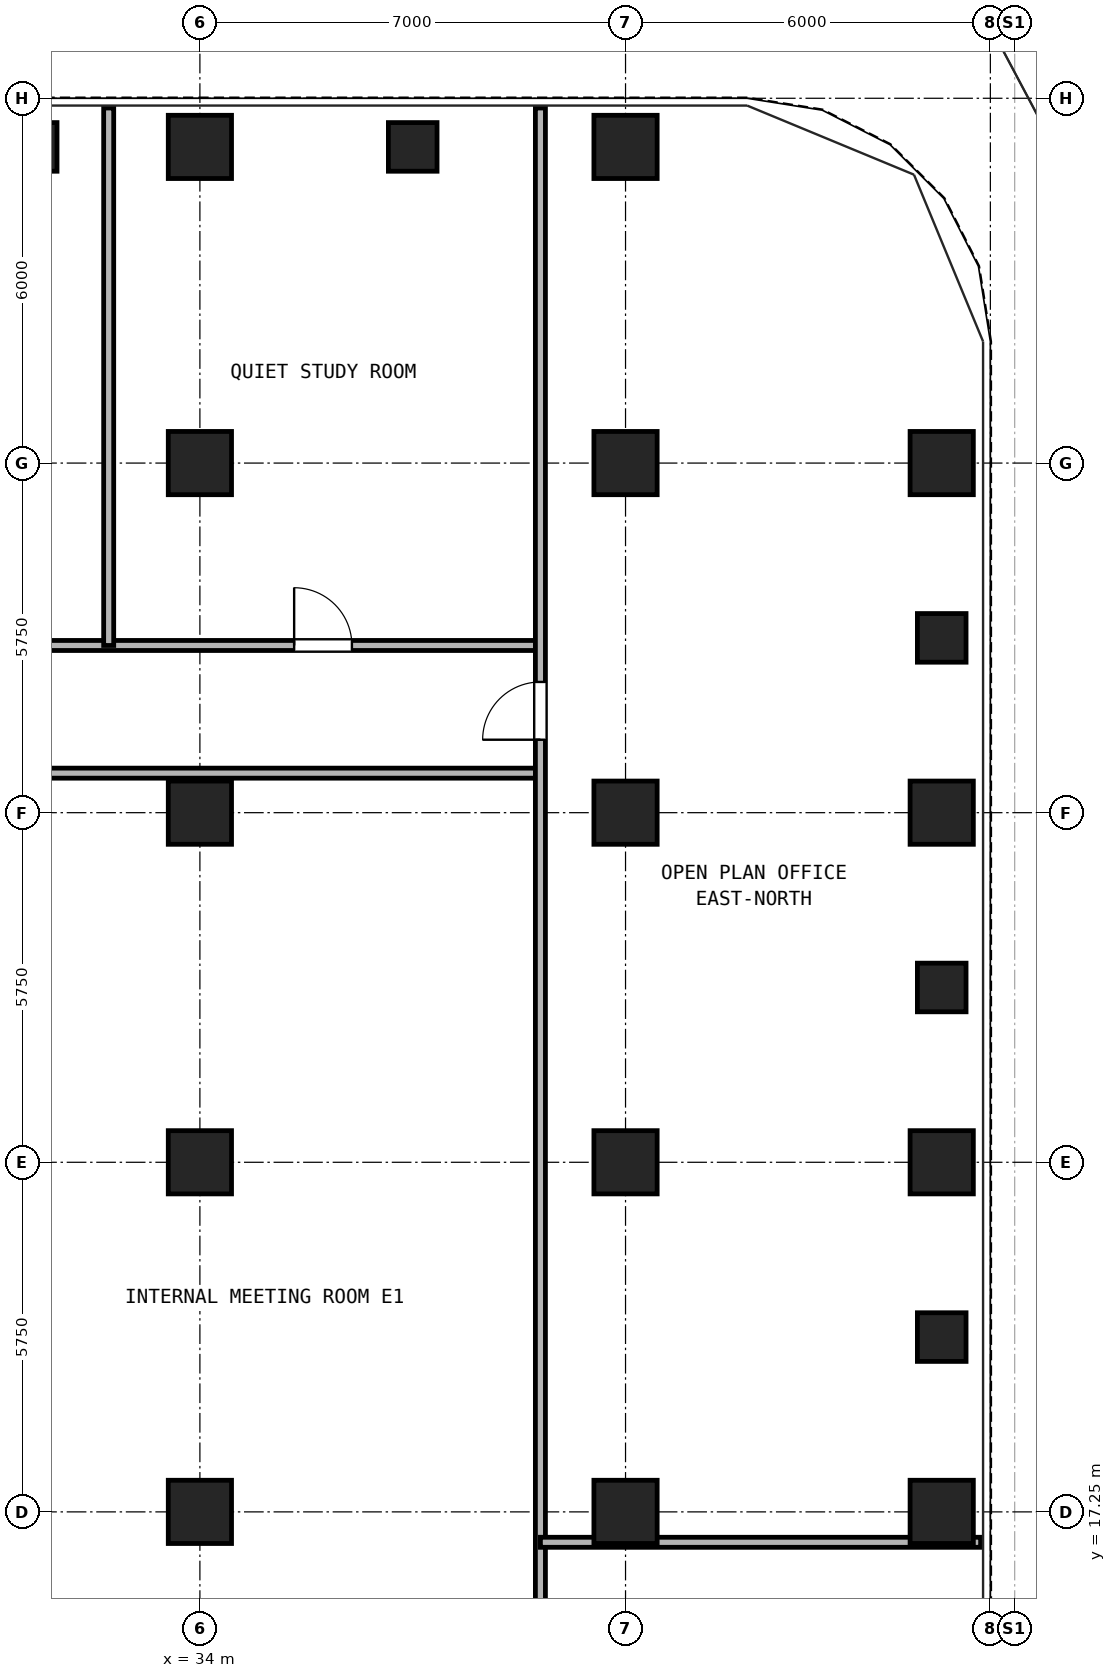
"""IFC4 building model, lengths in metres.
Left out: names, types, materials, properties, quantities, classifications, styles, units other than length and angle.
Written with IfcOpenShell. Run it as: python <this file> out.ifc"""

import sys

from ifc_helpers import new_model, si_unit, direction, frame, frame_2d, origin, origin_2d, place, context, subcontext, project, spatial, rectangle, hollow_rectangle, extrude, source, transform, mapped, element, fill, save


model = new_model("IFC4")
c1 = context("Model", 3, precision=1e-05, world=origin(), true_north=direction((0.0, 1.0)))
c2 = subcontext(c1, "Body", "Model", "MODEL_VIEW")
j1 = project(units=[si_unit("LENGTHUNIT", "METRE"), si_unit("PLANEANGLEUNIT", "RADIAN")], contexts=[c1])
p1 = place(None, origin())
s1 = spatial("IfcSite", under=j1, at=p1, CompositionType="ELEMENT")
p2 = place(p1, origin())
s2 = spatial("IfcBuilding", under=s1, at=p2, CompositionType="ELEMENT")
p3 = place(p2, frame((0.0, 0.0, 40.5)))
s3 = spatial("IfcBuildingStorey", under=s2, at=p3, CompositionType="ELEMENT", Elevation=40.5)
m1 = source(origin(), c2, "Body", "SweptSolid", [
    extrude(hollow_rectangle(XDim=1.04, YDim=1.04, WallThickness=0.065, at=origin_2d()), origin(), (0.0, 0.0, 1.0), 3.32),
])
for number, where, z_axis, x_axis in (
    (1, (34.0, 39.7, 0.0), (0.0, 0.0, 1.0), (1.0, 0.0, 0.0)),
    (2, (41.0, 39.7, 0.0), (0.0, 0.0, 1.0), (1.0, 0.0, 0.0)),
    (3, (46.2, 17.25, 0.0), (0.0, 0.0, 1.0), (1.0, 0.0, 0.0)),
    (4, (46.2, 23.0, 0.0), (0.0, 0.0, 1.0), (1.0, 0.0, 0.0)),
    (5, (46.2, 28.75, 0.0), (0.0, 0.0, 1.0), (1.0, 0.0, 0.0)),
    (6, (46.2, 34.5, 0.0), (0.0, 0.0, 1.0), (1.0, 0.0, 0.0)),
    (7, (34.0, 17.25, 0.0), (0.0, 0.0, 1.0), (1.0, 0.0, 0.0)),
    (8, (34.0, 23.0, 0.0), (0.0, 0.0, 1.0), (1.0, 0.0, 0.0)),
    (9, (34.0, 28.75, 0.0), (0.0, 0.0, 1.0), (1.0, 0.0, 0.0)),
    (10, (34.0, 34.5, 0.0), (0.0, 0.0, 1.0), (1.0, 0.0, 0.0)),
    (11, (41.0, 17.25, 0.0), (0.0, 0.0, 1.0), (1.0, 0.0, 0.0)),
    (12, (41.0, 23.0, 0.0), (0.0, 0.0, 1.0), (1.0, 0.0, 0.0)),
    (13, (41.0, 28.75, 0.0), (0.0, 0.0, 1.0), (1.0, 0.0, 0.0)),
    (14, (41.0, 34.5, 0.0), (0.0, 0.0, 1.0), (1.0, 0.0, 0.0)),
):
    element("IfcColumn", number, at=place(p3, frame(where, z_axis=z_axis, x_axis=x_axis)), inside=s3, PredefinedType="COLUMN", context=c2, shape_type="MappedRepresentation", body=[
        mapped(m1, transform((0.0, 0.0, 0.0), x_axis=(1.0, 0.0, 0.0), y_axis=(0.0, 1.0, 0.0), z_axis=(0.0, 0.0, 1.0), scale=1.0)),
    ])
m2 = source(origin(), c2, "Body", "SweptSolid", [
    extrude(hollow_rectangle(XDim=0.8, YDim=0.8, WallThickness=0.045, at=origin_2d()), origin(), (0.0, 0.0, 1.0), 3.32),
])
for number, where, z_axis, x_axis in (
    (15, (31.25, 39.7, 0.0), (0.0, 0.0, 1.0), (1.0, 0.0, 0.0)),
    (16, (37.5, 39.7, 0.0), (0.0, 0.0, 1.0), (1.0, 0.0, 0.0)),
    (17, (46.2, 20.125, 0.0), (0.0, 0.0, 1.0), (1.0, 0.0, 0.0)),
    (18, (46.2, 25.875, 0.0), (0.0, 0.0, 1.0), (1.0, 0.0, 0.0)),
    (19, (46.2, 31.625, 0.0), (0.0, 0.0, 1.0), (1.0, 0.0, 0.0)),
):
    element("IfcColumn", number, at=place(p3, frame(where, z_axis=z_axis, x_axis=x_axis)), inside=s3, PredefinedType="COLUMN", context=c2, shape_type="MappedRepresentation", body=[
        mapped(m2, transform((0.0, 0.0, 0.0), x_axis=(1.0, 0.0, 0.0), y_axis=(0.0, 1.0, 0.0), z_axis=(0.0, 0.0, 1.0), scale=1.0)),
    ])
p4 = place(p3, frame((7.4, 31.5, 0.0), z_axis=(0.0, 0.0, 1.0), x_axis=(1.0, 0.0, 0.0)))
e20 = element("IfcWall", 20, at=p4, inside=s3, PredefinedType="PARTITIONING", context=c2, shape_type="SweptSolid", body=[
    extrude(rectangle(XDim=32.2, YDim=0.165, at=frame_2d((16.1, 0.0))), origin(), (0.0, 0.0, 1.0), 2.898),
])
p5 = place(p4, frame((7.55, 0.0, 0.0)))
e21 = element("IfcOpeningElement", 21, at=p5, cuts=e20, PredefinedType="OPENING", context=c2, shape_type="SweptSolid", body=[
    extrude(rectangle(XDim=0.95, YDim=2.15, at=frame_2d((0.475, 1.075))), frame((0.0, 0.093, 0.0), z_axis=(0.0, -1.0, 0.0), x_axis=(1.0, 0.0, 0.0)), (0.0, 0.0, 1.0), 0.185),
])
p6 = place(p4, frame((20.1, 0.0, 0.0)))
e22 = element("IfcOpeningElement", 22, at=p6, cuts=e20, PredefinedType="OPENING", context=c2, shape_type="SweptSolid", body=[
    extrude(rectangle(XDim=0.95, YDim=2.15, at=frame_2d((0.475, 1.075))), frame((0.0, 0.093, 0.0), z_axis=(0.0, -1.0, 0.0), x_axis=(1.0, 0.0, 0.0)), (0.0, 0.0, 1.0), 0.185),
])
p7 = place(p4, frame((28.15, 0.0, 0.0)))
e23 = element("IfcOpeningElement", 23, at=p7, cuts=e20, PredefinedType="OPENING", context=c2, shape_type="SweptSolid", body=[
    extrude(rectangle(XDim=0.95, YDim=2.15, at=frame_2d((0.475, 1.075))), frame((0.0, 0.093, 0.0), z_axis=(0.0, -1.0, 0.0), x_axis=(1.0, 0.0, 0.0)), (0.0, 0.0, 1.0), 0.185),
])
p8 = place(p3, frame((30.7, 29.4, 0.0), z_axis=(0.0, 0.0, 1.0), x_axis=(1.0, 0.0, 0.0)))
e24 = element("IfcWall", 24, at=p8, inside=s3, PredefinedType="PARTITIONING", context=c2, shape_type="SweptSolid", body=[
    extrude(rectangle(XDim=8.9, YDim=0.165, at=frame_2d((4.45, 0.0))), origin(), (0.0, 0.0, 1.0), 3.32),
])
p9 = place(p3, frame((39.6, 0.16, 0.0), z_axis=(0.0, 0.0, 1.0), x_axis=(0.0, 1.0, 0.0)))
e25 = element("IfcWall", 25, at=p9, inside=s3, PredefinedType="PARTITIONING", context=c2, shape_type="SweptSolid", body=[
    extrude(rectangle(XDim=40.18, YDim=0.165, at=frame_2d((20.09, 0.0))), origin(), (0.0, 0.0, 1.0), 3.32),
])
p10 = place(p9, frame((9.44, 0.0, 0.0)))
e26 = element("IfcOpeningElement", 26, at=p10, cuts=e25, PredefinedType="OPENING", context=c2, shape_type="SweptSolid", body=[
    extrude(rectangle(XDim=0.95, YDim=2.15, at=frame_2d((0.475, 1.075))), frame((0.0, 0.093, 0.0), z_axis=(0.0, -1.0, 0.0), x_axis=(1.0, 0.0, 0.0)), (0.0, 0.0, 1.0), 0.185),
])
p11 = place(p9, frame((29.79, 0.0, 0.0)))
e27 = element("IfcOpeningElement", 27, at=p11, cuts=e25, PredefinedType="OPENING", context=c2, shape_type="SweptSolid", body=[
    extrude(rectangle(XDim=0.95, YDim=2.15, at=frame_2d((0.475, 1.075))), frame((0.0, 0.093, 0.0), z_axis=(0.0, -1.0, 0.0), x_axis=(1.0, 0.0, 0.0)), (0.0, 0.0, 1.0), 0.185),
])
p12 = place(p3, frame((32.5, 31.5, 0.0), z_axis=(0.0, 0.0, 1.0), x_axis=(0.0, 1.0, 0.0)))
e28 = element("IfcWall", 28, at=p12, inside=s3, PredefinedType="PARTITIONING", context=c2, shape_type="SweptSolid", body=[
    extrude(rectangle(XDim=8.84, YDim=0.165, at=frame_2d((4.42, 0.0))), origin(), (0.0, 0.0, 1.0), 3.32),
])
p13 = place(p3, frame((39.6, 16.75, 0.0), z_axis=(0.0, 0.0, 1.0), x_axis=(1.0, 0.0, 0.0)))
e29 = element("IfcWall", 29, at=p13, inside=s3, PredefinedType="PARTITIONING", context=c2, shape_type="SweptSolid", body=[
    extrude(rectangle(XDim=7.24, YDim=0.165, at=frame_2d((3.62, 0.0))), origin(), (0.0, 0.0, 1.0), 3.32),
])
p14 = place(p7, origin())
e30 = element("IfcDoor", 30, at=p14, inside=s3, OperationType="SINGLE_SWING_LEFT", PredefinedType="DOOR", context=c2, shape_type="SweptSolid", body=[
    extrude(rectangle(XDim=0.95, YDim=2.15, at=frame_2d((0.475, 1.075))), frame((0.0, 0.025, 0.0), z_axis=(0.0, -1.0, 0.0), x_axis=(1.0, 0.0, 0.0)), (0.0, 0.0, 1.0), 0.05),
])
fill(e23, e30)
p15 = place(p11, origin())
e31 = element("IfcDoor", 31, at=p15, inside=s3, OperationType="SINGLE_SWING_LEFT", PredefinedType="DOOR", context=c2, shape_type="SweptSolid", body=[
    extrude(rectangle(XDim=0.95, YDim=2.15, at=frame_2d((0.475, 1.075))), frame((0.0, 0.025, 0.0), z_axis=(0.0, -1.0, 0.0), x_axis=(1.0, 0.0, 0.0)), (0.0, 0.0, 1.0), 0.05),
])
fill(e27, e31)
save(model, sys.argv[1])
